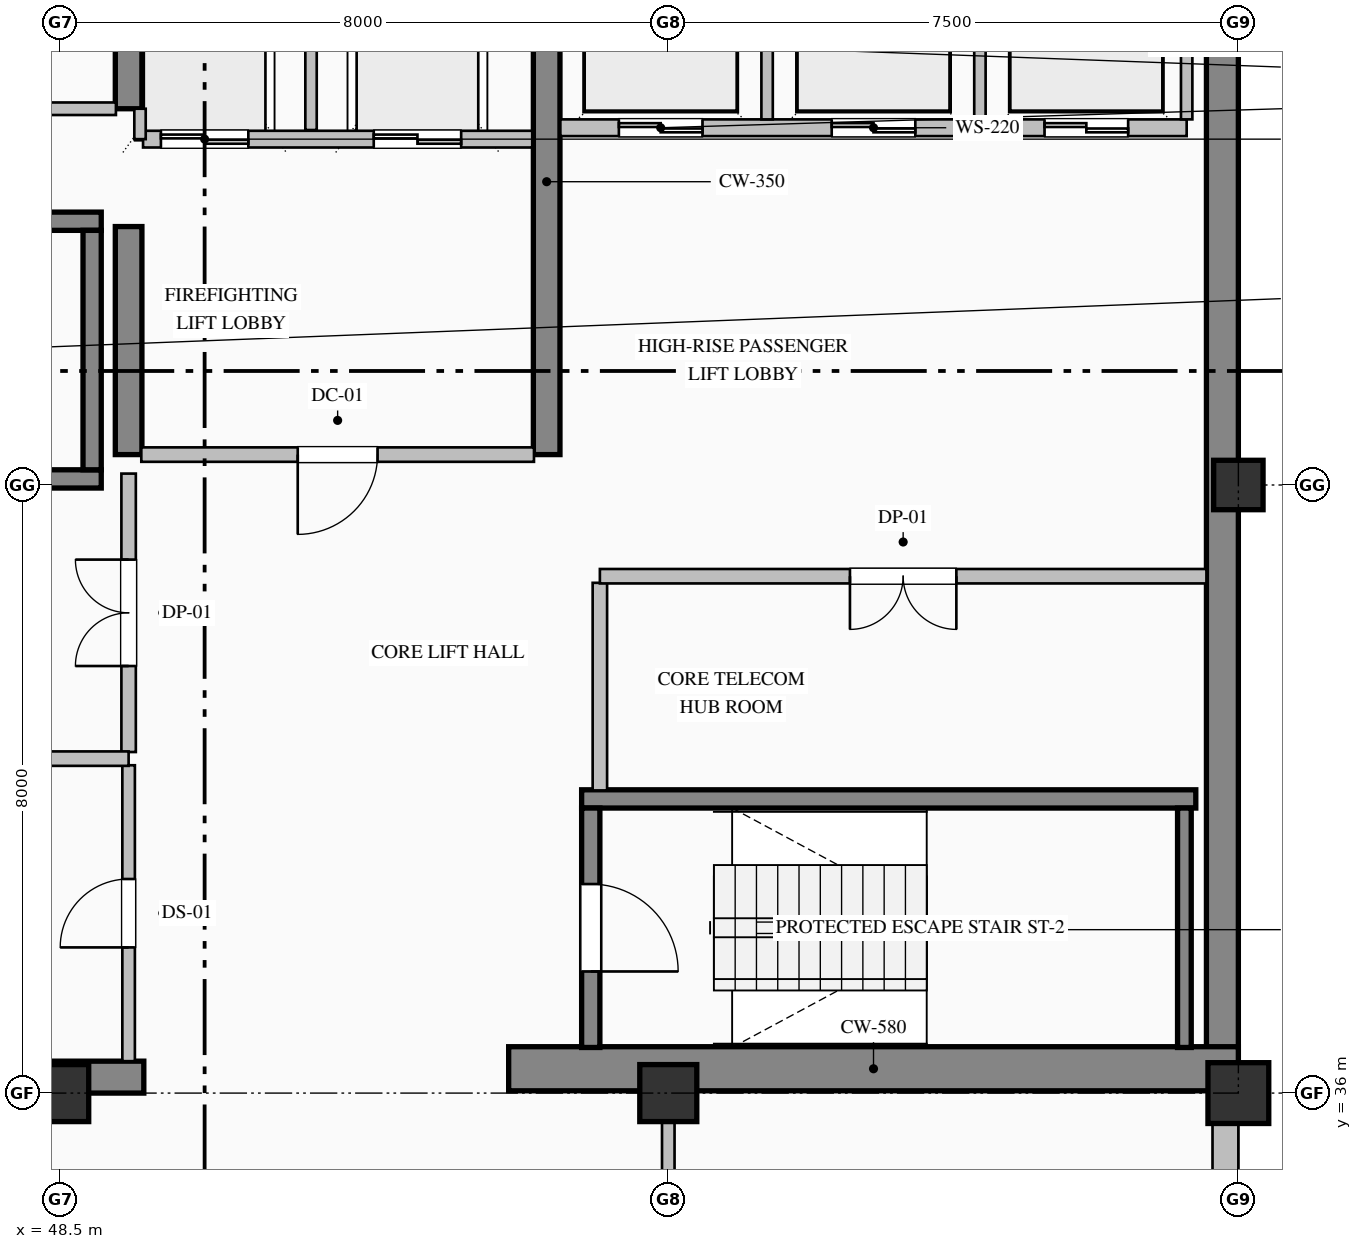
"""IFC4 building model, lengths in metres.
Left out: names, types, materials, properties, quantities, classifications, styles, units other than length and angle.
Written with IfcOpenShell. Run it as: python <this file> out.ifc"""

import sys

from ifc_helpers import new_model, si_unit, direction, frame, frame_2d, origin, origin_2d, place, context, subcontext, project, spatial, rectangle, hollow_rectangle, extrude, element, fill, save


model = new_model("IFC4")
c1 = context("Model", 3, precision=1e-05, world=origin(), true_north=direction((0.0, 1.0)))
c2 = subcontext(c1, "Body", "Model", "MODEL_VIEW")
j1 = project(units=[si_unit("LENGTHUNIT", "METRE"), si_unit("PLANEANGLEUNIT", "RADIAN")], contexts=[c1])
p1 = place(None, origin())
s1 = spatial("IfcSite", under=j1, at=p1, CompositionType="ELEMENT")
p2 = place(p1, origin())
s2 = spatial("IfcBuilding", under=s1, at=p2, CompositionType="ELEMENT")
p3 = place(p2, frame((0.0, 0.0, 287.2)))
s3 = spatial("IfcBuildingStorey", under=s2, at=p3, CompositionType="ELEMENT", Elevation=287.2)
p4 = place(p3, frame((63.79, 36.32, 0.0), z_axis=(0.0, 0.0, 1.0), x_axis=(0.0, 1.0, 0.0)))
e1 = element("IfcWall", 1, at=p4, inside=s3, PredefinedType="SHEAR", context=c2, shape_type="SweptSolid", body=[
    extrude(rectangle(XDim=15.26, YDim=0.42, at=frame_2d((7.63, 0.0))), origin(), (0.0, 0.0, 1.0), 3.785),
])
p5 = place(p3, frame((40.5, 36.21, 0.0), z_axis=(0.0, 0.0, 1.0), x_axis=(1.0, 0.0, 0.0)))
e2 = element("IfcWall", 2, at=p5, inside=s3, PredefinedType="SHEAR", context=c2, shape_type="SweptSolid", body=[
    extrude(rectangle(XDim=9.1, YDim=0.42, at=frame_2d((4.55, 0.0))), origin(), (0.0, 0.0, 1.0), 3.785),
])
p6 = place(p3, frame((54.4, 36.32, 0.0), z_axis=(0.0, 0.0, 1.0), x_axis=(1.0, 0.0, 0.0)))
e3 = element("IfcWall", 3, at=p6, inside=s3, PredefinedType="SHEAR", context=c2, shape_type="SweptSolid", body=[
    extrude(rectangle(XDim=9.6, YDim=0.58, at=frame_2d((4.8, 0.0))), origin(), (0.0, 0.0, 1.0), 4.0),
])
p7 = place(p3, frame((49.4, 44.4, 0.0), z_axis=(0.0, 0.0, 1.0), x_axis=(0.0, 1.0, 0.0)))
e4 = element("IfcWall", 4, at=p7, inside=s3, PredefinedType="SHEAR", context=c2, shape_type="SweptSolid", body=[
    extrude(rectangle(XDim=3.0, YDim=0.35, at=frame_2d((1.5, 0.0))), origin(), (0.0, 0.0, 1.0), 3.785),
])
p8 = place(p3, frame((49.4, 48.95, 0.0), z_axis=(0.0, 0.0, 1.0), x_axis=(0.0, 1.0, 0.0)))
e5 = element("IfcWall", 5, at=p8, inside=s3, PredefinedType="SHEAR", context=c2, shape_type="SweptSolid", body=[
    extrude(rectangle(XDim=2.63, YDim=0.35, at=frame_2d((1.315, 0.0))), origin(), (0.0, 0.0, 1.0), 3.785),
])
p9 = place(p3, frame((54.9, 44.4, 0.0), z_axis=(0.0, 0.0, 1.0), x_axis=(0.0, 1.0, 0.0)))
e6 = element("IfcWall", 6, at=p9, inside=s3, PredefinedType="SHEAR", context=c2, shape_type="SweptSolid", body=[
    extrude(rectangle(XDim=7.18, YDim=0.35, at=frame_2d((3.59, 0.0))), origin(), (0.0, 0.0, 1.0), 3.785),
])
for number, where, z_axis, x_axis in (
    (7, (48.5, 36.0, 0.0), (0.0, 0.0, 1.0), (1.0, 0.0, 0.0)),
    (8, (56.5, 36.0, 0.0), (0.0, 0.0, 1.0), (1.0, 0.0, 0.0)),
):
    element("IfcColumn", number, at=place(p3, frame(where, z_axis=z_axis, x_axis=x_axis)), inside=s3, PredefinedType="COLUMN", context=c2, shape_type="SweptSolid", body=[
        extrude(rectangle(XDim=0.75, YDim=0.75, at=origin_2d()), origin(), (0.0, 0.0, 1.0), 4.0),
    ])
p10 = place(p3, frame((64.0, 36.0, 0.0), z_axis=(0.0, 0.0, 1.0), x_axis=(1.0, 0.0, 0.0)))
e9 = element("IfcColumn", 9, at=p10, inside=s3, PredefinedType="COLUMN", context=c2, shape_type="SweptSolid", body=[
    extrude(hollow_rectangle(XDim=0.8, YDim=0.8, WallThickness=0.032, at=origin_2d()), origin(), (0.0, 0.0, 1.0), 4.0),
])
p11 = place(p3, frame((64.0, 44.0, 0.0), z_axis=(0.0, 0.0, 1.0), x_axis=(1.0, 0.0, 0.0)))
e10 = element("IfcColumn", 10, at=p11, inside=s3, PredefinedType="COLUMN", context=c2, shape_type="SweptSolid", body=[
    extrude(hollow_rectangle(XDim=0.65, YDim=0.65, WallThickness=0.028, at=origin_2d()), origin(), (0.0, 0.0, 1.0), 4.0),
])
p12 = place(p3, frame((63.83, 36.05, 0.0), z_axis=(0.0, 0.0, 1.0), x_axis=(0.0, -1.0, 0.0)))
e11 = element("IfcWall", 11, at=p12, inside=s3, PredefinedType="SOLIDWALL", context=c2, shape_type="SweptSolid", body=[
    extrude(rectangle(XDim=13.55, YDim=0.34, at=frame_2d((6.775, 0.0))), origin(), (0.0, 0.0, 1.0), 3.335),
])
p13 = place(p12, frame((3.125, 0.0, 0.9)))
e12 = element("IfcOpeningElement", 12, at=p13, cuts=e11, PredefinedType="OPENING", context=c2, shape_type="SweptSolid", body=[
    extrude(rectangle(XDim=0.95, YDim=1.85, at=frame_2d((0.475, 0.925))), frame((0.0, 0.18, 0.0), z_axis=(0.0, -1.0, 0.0), x_axis=(1.0, 0.0, 0.0)), (0.0, 0.0, 1.0), 0.36),
])
for number, where, z_axis, x_axis in (
    (13, (40.96, 47.47, 0.0), (0.0, 0.0, 1.0), (1.0, 0.0, 0.0)),
    (14, (49.04, 44.08, 0.0), (0.0, 0.0, 1.0), (-1.0, 0.0, 0.0)),
):
    element("IfcWall", number, at=place(p3, frame(where, z_axis=z_axis, x_axis=x_axis)), inside=s3, PredefinedType="SOLIDWALL", context=c2, shape_type="SweptSolid", body=[
        extrude(rectangle(XDim=8.08, YDim=0.24, at=frame_2d((4.04, 0.0))), origin(), (0.0, 0.0, 1.0), 4.0),
    ])
p14 = place(p3, frame((48.92, 44.2, 0.0), z_axis=(0.0, 0.0, 1.0), x_axis=(0.0, 1.0, 0.0)))
e15 = element("IfcWall", 15, at=p14, inside=s3, PredefinedType="SOLIDWALL", context=c2, shape_type="SweptSolid", body=[
    extrude(rectangle(XDim=3.15, YDim=0.24, at=frame_2d((1.575, 0.0))), origin(), (0.0, 0.0, 1.0), 4.0),
])
p15 = place(p3, frame((55.36, 39.87, 0.0), z_axis=(0.0, 0.0, 1.0), x_axis=(1.0, 0.0, 0.0)))
e16 = element("IfcWall", 16, at=p15, inside=s3, PredefinedType="SOLIDWALL", context=c2, shape_type="SweptSolid", body=[
    extrude(rectangle(XDim=8.08, YDim=0.24, at=frame_2d((4.04, 0.0))), origin(), (0.0, 0.0, 1.0), 4.0),
])
p16 = place(p3, frame((55.48, 39.75, 0.0), z_axis=(0.0, 0.0, 1.0), x_axis=(0.0, -1.0, 0.0)))
e17 = element("IfcWall", 17, at=p16, inside=s3, PredefinedType="SOLIDWALL", context=c2, shape_type="SweptSolid", body=[
    extrude(rectangle(XDim=3.15, YDim=0.24, at=frame_2d((1.575, 0.0))), origin(), (0.0, 0.0, 1.0), 4.0),
])
p17 = place(p16, frame((1.0, 0.0, 0.0)))
e18 = element("IfcOpeningElement", 18, at=p17, cuts=e17, PredefinedType="OPENING", context=c2, shape_type="SweptSolid", body=[
    extrude(rectangle(XDim=1.15, YDim=2.2, at=frame_2d((0.575, 1.1))), frame((0.0, 0.13, 0.0), z_axis=(0.0, -1.0, 0.0), x_axis=(1.0, 0.0, 0.0)), (0.0, 0.0, 1.0), 0.26),
])
p18 = place(p3, frame((63.29, 36.6, 0.0), z_axis=(0.0, 0.0, 1.0), x_axis=(0.0, 1.0, 0.0)))
e19 = element("IfcWall", 19, at=p18, inside=s3, PredefinedType="SOLIDWALL", context=c2, shape_type="SweptSolid", body=[
    extrude(rectangle(XDim=3.15, YDim=0.18, at=frame_2d((1.575, 0.0))), origin(), (0.0, 0.0, 1.0), 4.0),
])
p19 = place(p3, frame((54.71, 48.55, 0.0), z_axis=(0.0, 0.0, 1.0), x_axis=(-1.0, 0.0, 0.0)))
e20 = element("IfcWall", 20, at=p19, inside=s3, PredefinedType="PARTITIONING", context=c2, shape_type="SweptSolid", body=[
    extrude(rectangle(XDim=5.12, YDim=0.22, at=frame_2d((2.56, 0.0))), origin(), (0.0, 0.0, 1.0), 3.785),
])
p20 = place(p19, frame((3.735, 0.0, 0.0)))
e21 = element("IfcOpeningElement", 21, at=p20, cuts=e20, PredefinedType="OPENING", context=c2, shape_type="SweptSolid", body=[
    extrude(rectangle(XDim=1.15, YDim=2.2, at=frame_2d((0.575, 1.1))), frame((0.0, 0.12, 0.0), z_axis=(0.0, -1.0, 0.0), x_axis=(1.0, 0.0, 0.0)), (0.0, 0.0, 1.0), 0.24),
])
p21 = place(p19, frame((0.935, 0.0, 0.0)))
e22 = element("IfcOpeningElement", 22, at=p21, cuts=e20, PredefinedType="OPENING", context=c2, shape_type="SweptSolid", body=[
    extrude(rectangle(XDim=1.15, YDim=2.2, at=frame_2d((0.575, 1.1))), frame((0.0, 0.12, 0.0), z_axis=(0.0, -1.0, 0.0), x_axis=(1.0, 0.0, 0.0)), (0.0, 0.0, 1.0), 0.24),
])
p22 = place(p3, frame((51.8, 48.67, 0.0), z_axis=(0.0, 0.0, 1.0), x_axis=(0.0, 1.0, 0.0)))
e23 = element("IfcWall", 23, at=p22, inside=s3, PredefinedType="PARTITIONING", context=c2, shape_type="SweptSolid", body=[
    extrude(rectangle(XDim=2.91, YDim=0.15, at=frame_2d((1.455, 0.0))), origin(), (0.0, 0.0, 1.0), 3.785),
])
p23 = place(p3, frame((49.55, 48.55, 0.0), z_axis=(0.0, 0.0, 1.0), x_axis=(0.0, 1.0, 0.0)))
e24 = element("IfcWall", 24, at=p23, inside=s3, PredefinedType="PARTITIONING", context=c2, shape_type="SweptSolid", body=[
    extrude(rectangle(XDim=0.4, YDim=0.15, at=frame_2d((0.2, 0.0))), origin(), (0.0, 0.0, 1.0), 3.785),
])
p24 = place(p3, frame((63.32, 48.7, 0.0), z_axis=(0.0, 0.0, 1.0), x_axis=(-1.0, 0.0, 0.0)))
e25 = element("IfcWall", 25, at=p24, inside=s3, PredefinedType="PARTITIONING", context=c2, shape_type="SweptSolid", body=[
    extrude(rectangle(XDim=8.24, YDim=0.22, at=frame_2d((4.12, 0.0))), origin(), (0.0, 0.0, 1.0), 3.785),
])
p25 = place(p24, frame((6.37, 0.0, 0.0)))
e26 = element("IfcOpeningElement", 26, at=p25, cuts=e25, PredefinedType="OPENING", context=c2, shape_type="SweptSolid", body=[
    extrude(rectangle(XDim=1.1, YDim=2.2, at=frame_2d((0.55, 1.1))), frame((0.0, 0.12, 0.0), z_axis=(0.0, -1.0, 0.0), x_axis=(1.0, 0.0, 0.0)), (0.0, 0.0, 1.0), 0.24),
])
p26 = place(p24, frame((3.57, 0.0, 0.0)))
e27 = element("IfcOpeningElement", 27, at=p26, cuts=e25, PredefinedType="OPENING", context=c2, shape_type="SweptSolid", body=[
    extrude(rectangle(XDim=1.1, YDim=2.2, at=frame_2d((0.55, 1.1))), frame((0.0, 0.12, 0.0), z_axis=(0.0, -1.0, 0.0), x_axis=(1.0, 0.0, 0.0)), (0.0, 0.0, 1.0), 0.24),
])
p27 = place(p24, frame((0.77, 0.0, 0.0)))
e28 = element("IfcOpeningElement", 28, at=p27, cuts=e25, PredefinedType="OPENING", context=c2, shape_type="SweptSolid", body=[
    extrude(rectangle(XDim=1.1, YDim=2.2, at=frame_2d((0.55, 1.1))), frame((0.0, 0.12, 0.0), z_axis=(0.0, -1.0, 0.0), x_axis=(1.0, 0.0, 0.0)), (0.0, 0.0, 1.0), 0.24),
])
for number, where, z_axis, x_axis in (
    (29, (57.8, 48.81, 0.0), (0.0, 0.0, 1.0), (0.0, 1.0, 0.0)),
    (30, (60.6, 48.81, 0.0), (0.0, 0.0, 1.0), (0.0, 1.0, 0.0)),
    (31, (63.32, 48.81, 0.0), (0.0, 0.0, 1.0), (0.0, 1.0, 0.0)),
):
    element("IfcWall", number, at=place(p3, frame(where, z_axis=z_axis, x_axis=x_axis)), inside=s3, PredefinedType="PARTITIONING", context=c2, shape_type="SweptSolid", body=[
        extrude(rectangle(XDim=2.77, YDim=0.15, at=frame_2d((1.385, 0.0))), origin(), (0.0, 0.0, 1.0), 3.785),
    ])
p28 = place(p3, frame((46.6, 48.95, 0.0), z_axis=(0.0, 0.0, 1.0), x_axis=(1.0, 0.0, 0.0)))
e32 = element("IfcWall", 32, at=p28, inside=s3, PredefinedType="PARTITIONING", context=c2, shape_type="SweptSolid", body=[
    extrude(rectangle(XDim=2.633, YDim=0.165, at=frame_2d((1.316, 0.0))), origin(), (0.0, 0.0, 1.0), 3.785),
])
p29 = place(p28, frame((0.866, 0.0, 0.0)))
e33 = element("IfcOpeningElement", 33, at=p29, cuts=e32, PredefinedType="OPENING", context=c2, shape_type="SweptSolid", body=[
    extrude(rectangle(XDim=0.9, YDim=2.15, at=frame_2d((0.45, 1.075))), frame((0.0, 0.093, 0.0), z_axis=(0.0, -1.0, 0.0), x_axis=(1.0, 0.0, 0.0)), (0.0, 0.0, 1.0), 0.185),
])
p30 = place(p3, frame((54.733, 44.4, 0.0), z_axis=(0.0, 0.0, 1.0), x_axis=(-1.0, 0.0, 0.0)))
e34 = element("IfcWall", 34, at=p30, inside=s3, PredefinedType="PARTITIONING", context=c2, shape_type="SweptSolid", body=[
    extrude(rectangle(XDim=5.166, YDim=0.19, at=frame_2d((2.583, 0.0))), origin(), (0.0, 0.0, 1.0), 3.785),
])
p31 = place(p30, frame((2.058, 0.0, 0.0)))
e35 = element("IfcOpeningElement", 35, at=p31, cuts=e34, PredefinedType="OPENING", context=c2, shape_type="SweptSolid", body=[
    extrude(rectangle(XDim=1.05, YDim=2.15, at=frame_2d((0.525, 1.075))), frame((0.0, 0.105, 0.0), z_axis=(0.0, -1.0, 0.0), x_axis=(1.0, 0.0, 0.0)), (0.0, 0.0, 1.0), 0.21),
])
p32 = place(p3, frame((49.4, 36.42, 0.0), z_axis=(0.0, 0.0, 1.0), x_axis=(0.0, 1.0, 0.0)))
e36 = element("IfcWall", 36, at=p32, inside=s3, PredefinedType="PARTITIONING", context=c2, shape_type="SweptSolid", body=[
    extrude(rectangle(XDim=3.893, YDim=0.165, at=frame_2d((1.947, 0.0))), origin(), (0.0, 0.0, 1.0), 3.027),
])
p33 = place(p32, frame((1.497, 0.0, 0.0)))
e37 = element("IfcOpeningElement", 37, at=p33, cuts=e36, PredefinedType="OPENING", context=c2, shape_type="SweptSolid", body=[
    extrude(rectangle(XDim=0.9, YDim=2.15, at=frame_2d((0.45, 1.075))), frame((0.0, 0.093, 0.0), z_axis=(0.0, -1.0, 0.0), x_axis=(1.0, 0.0, 0.0)), (0.0, 0.0, 1.0), 0.185),
])
p34 = place(p3, frame((49.4, 40.487, 0.0), z_axis=(0.0, 0.0, 1.0), x_axis=(0.0, 1.0, 0.0)))
e38 = element("IfcWall", 38, at=p34, inside=s3, PredefinedType="PARTITIONING", context=c2, shape_type="SweptSolid", body=[
    extrude(rectangle(XDim=3.663, YDim=0.19, at=frame_2d((1.832, 0.0))), origin(), (0.0, 0.0, 1.0), 3.027),
])
p35 = place(p34, frame((1.132, 0.0, 0.0)))
e39 = element("IfcOpeningElement", 39, at=p35, cuts=e38, PredefinedType="OPENING", context=c2, shape_type="SweptSolid", body=[
    extrude(rectangle(XDim=1.4, YDim=2.25, at=frame_2d((0.7, 1.125))), frame((0.0, 0.105, 0.0), z_axis=(0.0, -1.0, 0.0), x_axis=(1.0, 0.0, 0.0)), (0.0, 0.0, 1.0), 0.21),
])
p36 = place(p3, frame((55.6, 42.713, 0.0), z_axis=(0.0, 0.0, 1.0), x_axis=(0.0, -1.0, 0.0)))
e40 = element("IfcWall", 40, at=p36, inside=s3, PredefinedType="PARTITIONING", context=c2, shape_type="SweptSolid", body=[
    extrude(rectangle(XDim=2.731, YDim=0.19, at=frame_2d((1.365, 0.0))), origin(), (0.0, 0.0, 1.0), 3.785),
])
p37 = place(p3, frame((40.92, 40.4, 0.0), z_axis=(0.0, 0.0, 1.0), x_axis=(1.0, 0.0, 0.0)))
e41 = element("IfcWall", 41, at=p37, inside=s3, PredefinedType="PARTITIONING", context=c2, shape_type="SweptSolid", body=[
    extrude(rectangle(XDim=8.48, YDim=0.19, at=frame_2d((4.24, 0.0))), origin(), (0.0, 0.0, 1.0), 3.785),
])
p38 = place(p3, frame((63.58, 42.8, 0.0), z_axis=(0.0, 0.0, 1.0), x_axis=(-1.0, 0.0, 0.0)))
e42 = element("IfcWall", 42, at=p38, inside=s3, PredefinedType="PARTITIONING", context=c2, shape_type="SweptSolid", body=[
    extrude(rectangle(XDim=7.98, YDim=0.19, at=frame_2d((3.99, 0.0))), origin(), (0.0, 0.0, 1.0), 3.785),
])
p39 = place(p38, frame((3.29, 0.0, 0.0)))
e43 = element("IfcOpeningElement", 43, at=p39, cuts=e42, PredefinedType="OPENING", context=c2, shape_type="SweptSolid", body=[
    extrude(rectangle(XDim=1.4, YDim=2.25, at=frame_2d((0.7, 1.125))), frame((0.0, 0.105, 0.0), z_axis=(0.0, -1.0, 0.0), x_axis=(1.0, 0.0, 0.0)), (0.0, 0.0, 1.0), 0.21),
])
p40 = place(p3, frame((56.5, 36.0, 0.0), z_axis=(0.0, 0.0, 1.0), x_axis=(0.0, -1.0, 0.0)))
e44 = element("IfcWall", 44, at=p40, inside=s3, PredefinedType="PARTITIONING", context=c2, shape_type="SweptSolid", body=[
    extrude(rectangle(XDim=2.325, YDim=0.165, at=frame_2d((1.163, 0.0))), origin(), (0.0, 0.0, 1.0), 3.177),
])
p41 = place(p17, origin())
e45 = element("IfcDoor", 45, at=p41, inside=s3, OperationType="SINGLE_SWING_RIGHT", PredefinedType="DOOR", context=c2, shape_type="SweptSolid", body=[
    extrude(rectangle(XDim=1.15, YDim=2.2, at=frame_2d((0.575, 1.1))), frame((0.0, 0.025, 0.0), z_axis=(0.0, -1.0, 0.0), x_axis=(1.0, 0.0, 0.0)), (0.0, 0.0, 1.0), 0.05),
])
fill(e18, e45)
p42 = place(p20, origin())
e46 = element("IfcDoor", 46, at=p42, inside=s3, OperationType="DOUBLE_DOOR_SLIDING", PredefinedType="DOOR", context=c2, shape_type="SweptSolid", body=[
    extrude(rectangle(XDim=1.15, YDim=2.2, at=frame_2d((0.575, 1.1))), frame((0.0, 0.025, 0.0), z_axis=(0.0, -1.0, 0.0), x_axis=(1.0, 0.0, 0.0)), (0.0, 0.0, 1.0), 0.05),
])
fill(e21, e46)
p43 = place(p21, origin())
e47 = element("IfcDoor", 47, at=p43, inside=s3, OperationType="DOUBLE_DOOR_SLIDING", PredefinedType="DOOR", context=c2, shape_type="SweptSolid", body=[
    extrude(rectangle(XDim=1.15, YDim=2.2, at=frame_2d((0.575, 1.1))), frame((0.0, 0.025, 0.0), z_axis=(0.0, -1.0, 0.0), x_axis=(1.0, 0.0, 0.0)), (0.0, 0.0, 1.0), 0.05),
])
fill(e22, e47)
p44 = place(p25, origin())
e48 = element("IfcDoor", 48, at=p44, inside=s3, OperationType="DOUBLE_DOOR_SLIDING", PredefinedType="DOOR", context=c2, shape_type="SweptSolid", body=[
    extrude(rectangle(XDim=1.1, YDim=2.2, at=frame_2d((0.55, 1.1))), frame((0.0, 0.025, 0.0), z_axis=(0.0, -1.0, 0.0), x_axis=(1.0, 0.0, 0.0)), (0.0, 0.0, 1.0), 0.05),
])
fill(e26, e48)
p45 = place(p26, origin())
e49 = element("IfcDoor", 49, at=p45, inside=s3, OperationType="DOUBLE_DOOR_SLIDING", PredefinedType="DOOR", context=c2, shape_type="SweptSolid", body=[
    extrude(rectangle(XDim=1.1, YDim=2.2, at=frame_2d((0.55, 1.1))), frame((0.0, 0.025, 0.0), z_axis=(0.0, -1.0, 0.0), x_axis=(1.0, 0.0, 0.0)), (0.0, 0.0, 1.0), 0.05),
])
fill(e27, e49)
p46 = place(p27, origin())
e50 = element("IfcDoor", 50, at=p46, inside=s3, OperationType="DOUBLE_DOOR_SLIDING", PredefinedType="DOOR", context=c2, shape_type="SweptSolid", body=[
    extrude(rectangle(XDim=1.1, YDim=2.2, at=frame_2d((0.55, 1.1))), frame((0.0, 0.025, 0.0), z_axis=(0.0, -1.0, 0.0), x_axis=(1.0, 0.0, 0.0)), (0.0, 0.0, 1.0), 0.05),
])
fill(e28, e50)
p47 = place(p31, origin())
e51 = element("IfcDoor", 51, at=p47, inside=s3, OperationType="SINGLE_SWING_RIGHT", PredefinedType="DOOR", context=c2, shape_type="SweptSolid", body=[
    extrude(rectangle(XDim=1.05, YDim=2.15, at=frame_2d((0.525, 1.075))), frame((0.0, 0.025, 0.0), z_axis=(0.0, -1.0, 0.0), x_axis=(1.0, 0.0, 0.0)), (0.0, 0.0, 1.0), 0.05),
])
fill(e35, e51)
p48 = place(p33, origin())
e52 = element("IfcDoor", 52, at=p48, inside=s3, OperationType="SINGLE_SWING_LEFT", PredefinedType="DOOR", context=c2, shape_type="SweptSolid", body=[
    extrude(rectangle(XDim=0.9, YDim=2.15, at=frame_2d((0.45, 1.075))), frame((0.0, 0.025, 0.0), z_axis=(0.0, -1.0, 0.0), x_axis=(1.0, 0.0, 0.0)), (0.0, 0.0, 1.0), 0.05),
])
fill(e37, e52)
p49 = place(p35, origin())
e53 = element("IfcDoor", 53, at=p49, inside=s3, OperationType="DOUBLE_DOOR_SINGLE_SWING", PredefinedType="DOOR", context=c2, shape_type="SweptSolid", body=[
    extrude(rectangle(XDim=1.4, YDim=2.25, at=frame_2d((0.7, 1.125))), frame((0.0, 0.025, 0.0), z_axis=(0.0, -1.0, 0.0), x_axis=(1.0, 0.0, 0.0)), (0.0, 0.0, 1.0), 0.05),
])
fill(e39, e53)
p50 = place(p39, origin())
e54 = element("IfcDoor", 54, at=p50, inside=s3, OperationType="DOUBLE_DOOR_SINGLE_SWING", PredefinedType="DOOR", context=c2, shape_type="SweptSolid", body=[
    extrude(rectangle(XDim=1.4, YDim=2.25, at=frame_2d((0.7, 1.125))), frame((0.0, 0.025, 0.0), z_axis=(0.0, -1.0, 0.0), x_axis=(1.0, 0.0, 0.0)), (0.0, 0.0, 1.0), 0.05),
])
fill(e43, e54)
save(model, sys.argv[1])
